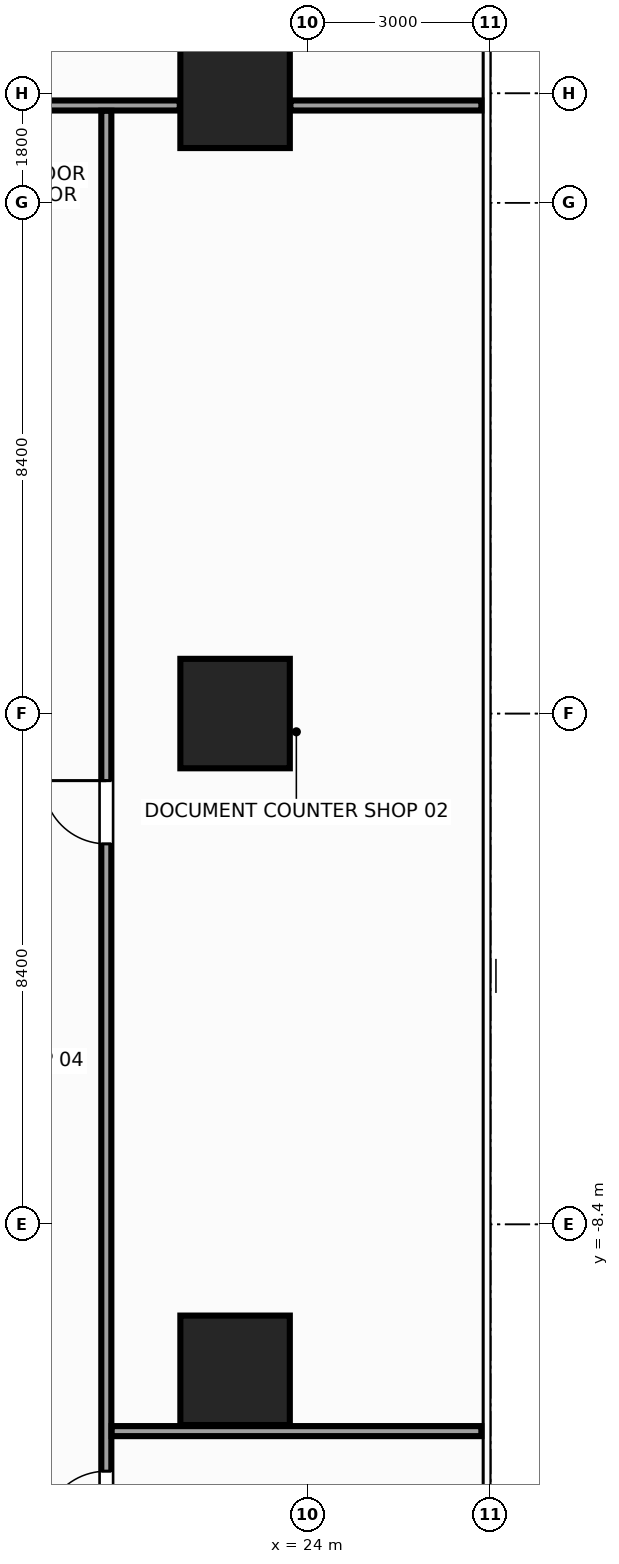
"""IFC4 building model, lengths in metres.
Left out: names, types, materials, properties, quantities, classifications, styles, units other than length and angle.
Written with IfcOpenShell. Run it as: python <this file> out.ifc"""

import sys

from ifc_helpers import new_model, si_unit, direction, frame, frame_2d, origin, origin_2d, place, context, subcontext, project, spatial, rectangle, extrude, source, transform, mapped, element, fill, save


model = new_model("IFC4")
c1 = context("Model", 3, precision=1e-05, world=origin(), true_north=direction((0.0, 1.0)))
c2 = subcontext(c1, "Body", "Model", "MODEL_VIEW")
j1 = project(units=[si_unit("LENGTHUNIT", "METRE"), si_unit("PLANEANGLEUNIT", "RADIAN")], contexts=[c1])
p1 = place(None, origin())
s1 = spatial("IfcSite", under=j1, at=p1, CompositionType="ELEMENT")
p2 = place(p1, origin())
s2 = spatial("IfcBuilding", under=s1, at=p2, CompositionType="ELEMENT")
p3 = place(p2, frame((0.0, 0.0, 56.0)))
s3 = spatial("IfcBuildingStorey", under=s2, at=p3, CompositionType="ELEMENT", Elevation=56.0)
m1 = source(origin(), c2, "Body", "SweptSolid", [
    extrude(rectangle(XDim=1.8, YDim=1.8, at=origin_2d()), origin(), (0.0, 0.0, 1.0), 3.6),
])
for number, where, z_axis, x_axis in (
    (1, (22.8, -10.8, 0.0), (0.0, 0.0, 1.0), (1.0, 0.0, 0.0)),
    (2, (22.8, 0.0, 0.0), (0.0, 0.0, 1.0), (1.0, 0.0, 0.0)),
    (3, (22.8, 10.2, 0.0), (0.0, 0.0, 1.0), (1.0, 0.0, 0.0)),
):
    element("IfcColumn", number, at=place(p3, frame(where, z_axis=z_axis, x_axis=x_axis)), inside=s3, PredefinedType="COLUMN", context=c2, shape_type="MappedRepresentation", body=[
        mapped(m1, transform((0.0, 0.0, 0.0), x_axis=(1.0, 0.0, 0.0), y_axis=(0.0, 1.0, 0.0), z_axis=(0.0, 0.0, 1.0), scale=1.0)),
    ])
m2 = source(origin(), c2, "Body", "SweptSolid", [
    extrude(rectangle(XDim=4.18, YDim=0.165, at=frame_2d((2.09, 0.0))), origin(), (0.0, 0.0, 1.0), 2.745),
])
p4 = place(p3, frame((17.71, 10.0, 0.0), z_axis=(0.0, 0.0, 1.0), x_axis=(1.0, 0.0, 0.0)))
e4 = element("IfcWall", 4, at=p4, inside=s3, PredefinedType="PARTITIONING", context=c2, shape_type="MappedRepresentation", body=[
    mapped(m2, transform((0.0, 0.0, 0.0), x_axis=(1.0, 0.0, 0.0), y_axis=(0.0, 1.0, 0.0), z_axis=(0.0, 0.0, 1.0), scale=1.0)),
])
m3 = source(origin(), c2, "Body", "SweptSolid", [
    extrude(rectangle(XDim=3.14, YDim=0.165, at=frame_2d((1.57, 0.0))), origin(), (0.0, 0.0, 1.0), 2.435),
])
p5 = place(p3, frame((23.71, 10.0, 0.0), z_axis=(0.0, 0.0, 1.0), x_axis=(1.0, 0.0, 0.0)))
e5 = element("IfcWall", 5, at=p5, inside=s3, PredefinedType="PARTITIONING", context=c2, shape_type="MappedRepresentation", body=[
    mapped(m3, transform((0.0, 0.0, 0.0), x_axis=(1.0, 0.0, 0.0), y_axis=(0.0, 1.0, 0.0), z_axis=(0.0, 0.0, 1.0), scale=1.0)),
])
m4 = source(origin(), c2, "Body", "SweptSolid", [
    extrude(rectangle(XDim=24.108, YDim=0.165, at=frame_2d((12.054, 0.0))), origin(), (0.0, 0.0, 1.0), 2.745),
])
p6 = place(p3, frame((20.683, -14.195, 0.0), z_axis=(0.0, 0.0, 1.0), x_axis=(0.0, 1.0, 0.0)))
e6 = element("IfcWall", 6, at=p6, inside=s3, PredefinedType="PARTITIONING", context=c2, shape_type="MappedRepresentation", body=[
    mapped(m4, transform((0.0, 0.0, 0.0), x_axis=(1.0, 0.0, 0.0), y_axis=(0.0, 1.0, 0.0), z_axis=(0.0, 0.0, 1.0), scale=1.0)),
])
p7 = place(p6, frame((12.052, 0.0, 0.0)))
e7 = element("IfcOpeningElement", 7, at=p7, cuts=e6, PredefinedType="OPENING", context=c2, shape_type="SweptSolid", body=[
    extrude(rectangle(XDim=1.04, YDim=2.2, at=frame_2d((0.52, 1.1))), frame((0.0, 0.094, 0.0), z_axis=(0.0, -1.0, 0.0), x_axis=(1.0, 0.0, 0.0)), (0.0, 0.0, 1.0), 0.189),
])
p8 = place(p6, frame((0.696, 0.0, 0.0)))
e8 = element("IfcOpeningElement", 8, at=p8, cuts=e6, PredefinedType="OPENING", context=c2, shape_type="SweptSolid", body=[
    extrude(rectangle(XDim=1.04, YDim=2.2, at=frame_2d((0.52, 1.1))), frame((0.0, 0.094, 0.0), z_axis=(0.0, -1.0, 0.0), x_axis=(1.0, 0.0, 0.0)), (0.0, 0.0, 1.0), 0.189),
])
m5 = source(origin(), c2, "Body", "SweptSolid", [
    extrude(rectangle(XDim=6.08, YDim=0.165, at=frame_2d((3.04, 0.0))), origin(), (0.0, 0.0, 1.0), 2.945),
])
p9 = place(p3, frame((20.77, -11.8, 0.0), z_axis=(0.0, 0.0, 1.0), x_axis=(1.0, 0.0, 0.0)))
e9 = element("IfcWall", 9, at=p9, inside=s3, PredefinedType="PARTITIONING", context=c2, shape_type="MappedRepresentation", body=[
    mapped(m5, transform((0.0, 0.0, 0.0), x_axis=(1.0, 0.0, 0.0), y_axis=(0.0, 1.0, 0.0), z_axis=(0.0, 0.0, 1.0), scale=1.0)),
])
m6 = source(origin(), c2, "Body", "SweptSolid", [
    extrude(rectangle(XDim=1.04, YDim=2.2, at=frame_2d((0.52, 1.1))), frame((0.0, 0.025, 0.0), z_axis=(0.0, -1.0, 0.0), x_axis=(1.0, 0.0, 0.0)), (0.0, 0.0, 1.0), 0.05),
])
p10 = place(p7, origin())
e10 = element("IfcDoor", 10, at=p10, inside=s3, OperationType="SINGLE_SWING_RIGHT", PredefinedType="DOOR", context=c2, shape_type="MappedRepresentation", body=[
    mapped(m6, transform((0.0, 0.0, 0.0), x_axis=(1.0, 0.0, 0.0), y_axis=(0.0, 1.0, 0.0), z_axis=(0.0, 0.0, 1.0), scale=1.0)),
])
fill(e7, e10)
p11 = place(p8, origin())
e11 = element("IfcDoor", 11, at=p11, inside=s3, OperationType="SINGLE_SWING_LEFT", PredefinedType="DOOR", context=c2, shape_type="MappedRepresentation", body=[
    mapped(m6, transform((0.0, 0.0, 0.0), x_axis=(1.0, 0.0, 0.0), y_axis=(0.0, 1.0, 0.0), z_axis=(0.0, 0.0, 1.0), scale=1.0)),
])
fill(e8, e11)
save(model, sys.argv[1])
